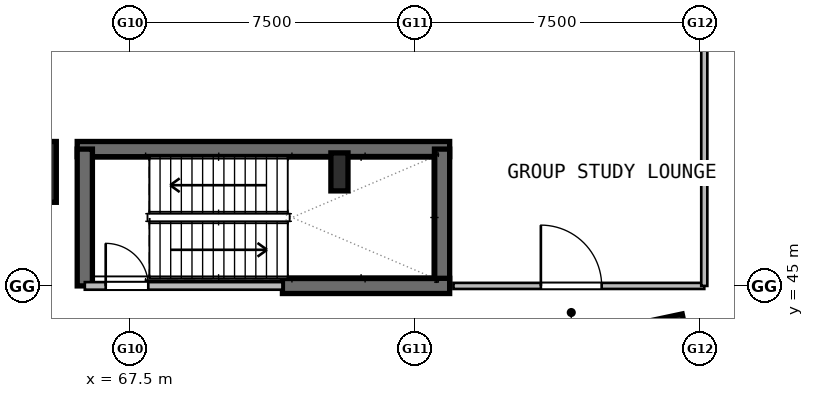
"""IFC4 building model, lengths in metres.
Left out: names, types, materials, properties, quantities, classifications, styles, units other than length and angle.
Written with IfcOpenShell. Run it as: python <this file> out.ifc"""

import sys

from ifc_helpers import new_model, si_unit, direction, frame, frame_2d, origin, origin_2d, place, context, subcontext, project, spatial, rectangle, hollow_rectangle, i_section, extrude, element, fill, save


model = new_model("IFC4")
c1 = context("Model", 3, precision=1e-05, world=origin(), true_north=direction((0.0, 1.0)))
c2 = subcontext(c1, "Body", "Model", "MODEL_VIEW")
j1 = project(units=[si_unit("LENGTHUNIT", "METRE"), si_unit("PLANEANGLEUNIT", "RADIAN")], contexts=[c1])
p1 = place(None, origin())
s1 = spatial("IfcSite", under=j1, at=p1, CompositionType="ELEMENT")
p2 = place(p1, origin())
s2 = spatial("IfcBuilding", under=s1, at=p2, CompositionType="ELEMENT")
p3 = place(p2, frame((0.0, 0.0, 10.8)))
s3 = spatial("IfcBuildingStorey", under=s2, at=p3, CompositionType="ELEMENT", Elevation=10.8)
for number, where, z_axis, x_axis in (
    (1, (64.75, 48.0, 0.0), (0.0, 0.0, 1.0), (1.0, 0.0, 0.0)),
    (2, (81.403, 43.313, 0.0), (0.0, 0.0, 1.0), (0.978, 0.208, 0.0)),
):
    element("IfcColumn", number, at=place(p3, frame(where, z_axis=z_axis, x_axis=x_axis)), inside=s3, PredefinedType="COLUMN", context=c2, shape_type="SweptSolid", body=[
        extrude(hollow_rectangle(XDim=1.6, YDim=1.6, WallThickness=0.04, at=origin_2d()), origin(), (0.0, 0.0, 1.0), 4.8),
    ])
p4 = place(p3, frame((73.0, 48.0, 0.0), z_axis=(0.0, 0.0, 1.0), x_axis=(1.0, 0.0, 0.0)))
e3 = element("IfcColumn", 3, at=p4, inside=s3, PredefinedType="COLUMN", context=c2, shape_type="SweptSolid", body=[
    extrude(i_section(OverallWidth=0.45, OverallDepth=1.0, WebThickness=0.022, FlangeThickness=0.04, at=origin_2d()), origin(), (0.0, 0.0, 1.0), 4.8),
])
p5 = place(p3, frame((66.1, 48.6, 0.0), z_axis=(0.0, 0.0, 1.0), x_axis=(1.0, 0.0, 0.0)))
e4 = element("IfcWall", 4, at=p5, inside=s3, PredefinedType="SHEAR", context=c2, shape_type="SweptSolid", body=[
    extrude(rectangle(XDim=9.8, YDim=0.4, at=frame_2d((4.9, 0.0))), origin(), (0.0, 0.0, 1.0), 4.8),
])
for number, where, z_axis, x_axis in (
    (5, (66.3, 45.0, 0.0), (0.0, 0.0, 1.0), (0.0, 1.0, 0.0)),
    (6, (75.7, 45.0, 0.0), (0.0, 0.0, 1.0), (0.0, 1.0, 0.0)),
):
    element("IfcWall", number, at=place(p3, frame(where, z_axis=z_axis, x_axis=x_axis)), inside=s3, PredefinedType="SHEAR", context=c2, shape_type="SweptSolid", body=[
        extrude(rectangle(XDim=3.6, YDim=0.4, at=frame_2d((1.8, 0.0))), origin(), (0.0, 0.0, 1.0), 4.8),
    ])
p6 = place(p3, frame((71.5, 45.0, 0.0), z_axis=(0.0, 0.0, 1.0), x_axis=(1.0, 0.0, 0.0)))
e7 = element("IfcWall", 7, at=p6, inside=s3, PredefinedType="SHEAR", context=c2, shape_type="SweptSolid", body=[
    extrude(rectangle(XDim=4.4, YDim=0.4, at=frame_2d((2.2, 0.0))), origin(), (0.0, 0.0, 1.0), 4.8),
])
p7 = place(p3, frame((66.3, 45.0, 0.0), z_axis=(0.0, 0.0, 1.0), x_axis=(1.0, 0.0, 0.0)))
e8 = element("IfcWall", 8, at=p7, inside=s3, PredefinedType="PARTITIONING", context=c2, shape_type="SweptSolid", body=[
    extrude(rectangle(XDim=5.2, YDim=0.2, at=frame_2d((2.6, 0.0))), origin(), (0.0, 0.0, 1.0), 4.48),
])
p8 = place(p7, frame((0.55, 0.0, 0.0)))
e9 = element("IfcOpeningElement", 9, at=p8, cuts=e8, PredefinedType="OPENING", context=c2, shape_type="SweptSolid", body=[
    extrude(rectangle(XDim=1.12, YDim=2.1, at=frame_2d((0.56, 1.05))), frame((0.0, 0.11, 0.0), z_axis=(0.0, -1.0, 0.0), x_axis=(1.0, 0.0, 0.0)), (0.0, 0.0, 1.0), 0.22),
])
p9 = place(p3, frame((76.0, 45.0, 0.0), z_axis=(0.0, 0.0, 1.0), x_axis=(1.0, 0.0, 0.0)))
e10 = element("IfcWall", 10, at=p9, inside=s3, PredefinedType="PARTITIONING", context=c2, shape_type="SweptSolid", body=[
    extrude(rectangle(XDim=6.6, YDim=0.16, at=frame_2d((3.3, 0.0))), origin(), (0.0, 0.0, 1.0), 4.48),
])
p10 = place(p9, frame((2.3, 0.0, 0.0)))
e11 = element("IfcOpeningElement", 11, at=p10, cuts=e10, PredefinedType="OPENING", context=c2, shape_type="SweptSolid", body=[
    extrude(rectangle(XDim=1.6, YDim=2.2, at=frame_2d((0.8, 1.1))), frame((0.0, 0.09, 0.0), z_axis=(0.0, -1.0, 0.0), x_axis=(1.0, 0.0, 0.0)), (0.0, 0.0, 1.0), 0.18),
])
p11 = place(p3, frame((82.6, 45.0, 0.0), z_axis=(0.0, 0.0, 1.0), x_axis=(0.0, 1.0, 0.0)))
e12 = element("IfcWall", 12, at=p11, inside=s3, PredefinedType="PARTITIONING", context=c2, shape_type="SweptSolid", body=[
    extrude(rectangle(XDim=6.35, YDim=0.16, at=frame_2d((3.175, 0.0))), origin(), (0.0, 0.0, 1.0), 4.48),
])
p12 = place(p8, origin())
e13 = element("IfcDoor", 13, at=p12, inside=s3, OperationType="SINGLE_SWING_RIGHT", PredefinedType="DOOR", context=c2, shape_type="SweptSolid", body=[
    extrude(rectangle(XDim=1.12, YDim=2.1, at=frame_2d((0.56, 1.05))), frame((0.0, 0.025, 0.0), z_axis=(0.0, -1.0, 0.0), x_axis=(1.0, 0.0, 0.0)), (0.0, 0.0, 1.0), 0.05),
])
fill(e9, e13)
p13 = place(p10, origin())
e14 = element("IfcDoor", 14, at=p13, inside=s3, OperationType="DOUBLE_DOOR_SINGLE_SWING", PredefinedType="DOOR", context=c2, shape_type="SweptSolid", body=[
    extrude(rectangle(XDim=1.6, YDim=2.2, at=frame_2d((0.8, 1.1))), frame((0.0, 0.025, 0.0), z_axis=(0.0, -1.0, 0.0), x_axis=(1.0, 0.0, 0.0)), (0.0, 0.0, 1.0), 0.05),
])
fill(e11, e14)
save(model, sys.argv[1])
